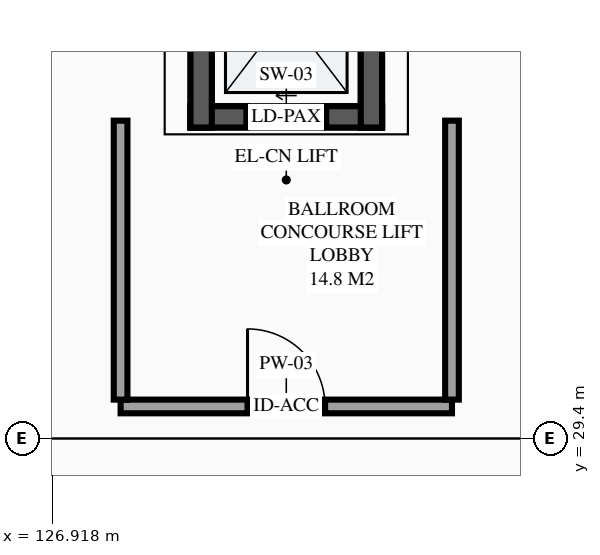
"""IFC4 building model, lengths in metres.
Left out: names, types, materials, properties, quantities, classifications, styles, units other than length and angle.
Written with IfcOpenShell. Run it as: python <this file> out.ifc"""

import sys

from ifc_helpers import new_model, si_unit, direction, frame, frame_2d, origin, place, context, subcontext, project, spatial, rectangle, extrude, element, fill, save


model = new_model("IFC4")
c1 = context("Model", 3, precision=1e-05, world=origin(), true_north=direction((0.0, 1.0)))
c2 = subcontext(c1, "Body", "Model", "MODEL_VIEW")
j1 = project(units=[si_unit("LENGTHUNIT", "METRE"), si_unit("PLANEANGLEUNIT", "RADIAN")], contexts=[c1])
p1 = place(None, origin())
s1 = spatial("IfcSite", under=j1, at=p1, CompositionType="ELEMENT")
p2 = place(p1, origin())
s2 = spatial("IfcBuilding", under=s1, at=p2, CompositionType="ELEMENT")
p3 = place(p2, frame((0.0, 0.0, -4.5)))
s3 = spatial("IfcBuildingStorey", under=s2, at=p3, CompositionType="ELEMENT", Elevation=-4.5)
p4 = place(p3, frame((128.74, 33.63, -1.5), z_axis=(0.0, 0.0, 1.0), x_axis=(1.0, 0.0, 0.0)))
e1 = element("IfcWall", 1, at=p4, inside=s3, PredefinedType="SHEAR", context=c2, shape_type="SweptSolid", body=[
    extrude(rectangle(XDim=2.52, YDim=0.28, at=frame_2d((1.26, 0.0))), origin(), (0.0, 0.0, 1.0), 1.5),
])
for number, where, z_axis, x_axis in (
    (2, (131.12, 33.49, -1.5), (0.0, 0.0, 1.0), (0.0, 1.0, 0.0)),
    (3, (128.88, 36.51, -1.5), (0.0, 0.0, 1.0), (0.0, -1.0, 0.0)),
):
    element("IfcWall", number, at=place(p3, frame(where, z_axis=z_axis, x_axis=x_axis)), inside=s3, PredefinedType="SHEAR", context=c2, shape_type="SweptSolid", body=[
        extrude(rectangle(XDim=3.02, YDim=0.28, at=frame_2d((1.51, 0.0))), origin(), (0.0, 0.0, 1.0), 1.5),
    ])
p5 = place(p3, frame((128.74, 33.63, 0.0), z_axis=(0.0, 0.0, 1.0), x_axis=(1.0, 0.0, 0.0)))
e4 = element("IfcWall", 4, at=p5, inside=s3, PredefinedType="SHEAR", context=c2, shape_type="SweptSolid", body=[
    extrude(rectangle(XDim=2.52, YDim=0.28, at=frame_2d((1.26, 0.0))), origin(), (0.0, 0.0, 1.0), 4.5),
])
p6 = place(p5, frame((0.735, 0.0, 0.0)))
e5 = element("IfcOpeningElement", 5, at=p6, cuts=e4, PredefinedType="OPENING", context=c2, shape_type="SweptSolid", body=[
    extrude(rectangle(XDim=1.05, YDim=2.2, at=frame_2d((0.525, 1.1))), frame((0.0, 0.15, 0.0), z_axis=(0.0, -1.0, 0.0), x_axis=(1.0, 0.0, 0.0)), (0.0, 0.0, 1.0), 0.3),
])
for number, where, z_axis, x_axis in (
    (6, (131.12, 33.49, 0.0), (0.0, 0.0, 1.0), (0.0, 1.0, 0.0)),
    (7, (128.88, 36.51, 0.0), (0.0, 0.0, 1.0), (0.0, -1.0, 0.0)),
):
    element("IfcWall", number, at=place(p3, frame(where, z_axis=z_axis, x_axis=x_axis)), inside=s3, PredefinedType="SHEAR", context=c2, shape_type="SweptSolid", body=[
        extrude(rectangle(XDim=3.02, YDim=0.28, at=frame_2d((1.51, 0.0))), origin(), (0.0, 0.0, 1.0), 4.5),
    ])
p7 = place(p3, frame((127.82, 29.82, 0.0), z_axis=(0.0, 0.0, 1.0), x_axis=(1.0, 0.0, 0.0)))
e8 = element("IfcWall", 8, at=p7, inside=s3, PredefinedType="PARTITIONING", context=c2, shape_type="SweptSolid", body=[
    extrude(rectangle(XDim=4.36, YDim=0.18, at=frame_2d((2.18, 0.0))), origin(), (0.0, 0.0, 1.0), 4.175),
])
p8 = place(p7, frame((1.67, 0.0, 0.0)))
e9 = element("IfcOpeningElement", 9, at=p8, cuts=e8, PredefinedType="OPENING", context=c2, shape_type="SweptSolid", body=[
    extrude(rectangle(XDim=1.02, YDim=2.15, at=frame_2d((0.51, 1.075))), frame((0.0, 0.1, 0.0), z_axis=(0.0, -1.0, 0.0), x_axis=(1.0, 0.0, 0.0)), (0.0, 0.0, 1.0), 0.2),
])
for number, where, z_axis, x_axis in (
    (10, (127.82, 29.91, 0.0), (0.0, 0.0, 1.0), (0.0, 1.0, 0.0)),
    (11, (132.18, 29.91, 0.0), (0.0, 0.0, 1.0), (0.0, 1.0, 0.0)),
):
    element("IfcWall", number, at=place(p3, frame(where, z_axis=z_axis, x_axis=x_axis)), inside=s3, PredefinedType="PARTITIONING", context=c2, shape_type="SweptSolid", body=[
        extrude(rectangle(XDim=3.67, YDim=0.18, at=frame_2d((1.835, 0.0))), origin(), (0.0, 0.0, 1.0), 4.175),
    ])
p9 = place(p6, origin())
e12 = element("IfcDoor", 12, at=p9, inside=s3, OperationType="SLIDING_TO_LEFT", PredefinedType="DOOR", context=c2, shape_type="SweptSolid", body=[
    extrude(rectangle(XDim=1.05, YDim=2.2, at=frame_2d((0.525, 1.1))), frame((0.0, 0.025, 0.0), z_axis=(0.0, -1.0, 0.0), x_axis=(1.0, 0.0, 0.0)), (0.0, 0.0, 1.0), 0.05),
])
fill(e5, e12)
p10 = place(p8, origin())
e13 = element("IfcDoor", 13, at=p10, inside=s3, OperationType="SINGLE_SWING_LEFT", PredefinedType="DOOR", context=c2, shape_type="SweptSolid", body=[
    extrude(rectangle(XDim=1.02, YDim=2.15, at=frame_2d((0.51, 1.075))), frame((0.0, 0.025, 0.0), z_axis=(0.0, -1.0, 0.0), x_axis=(1.0, 0.0, 0.0)), (0.0, 0.0, 1.0), 0.05),
])
fill(e9, e13)
save(model, sys.argv[1])
